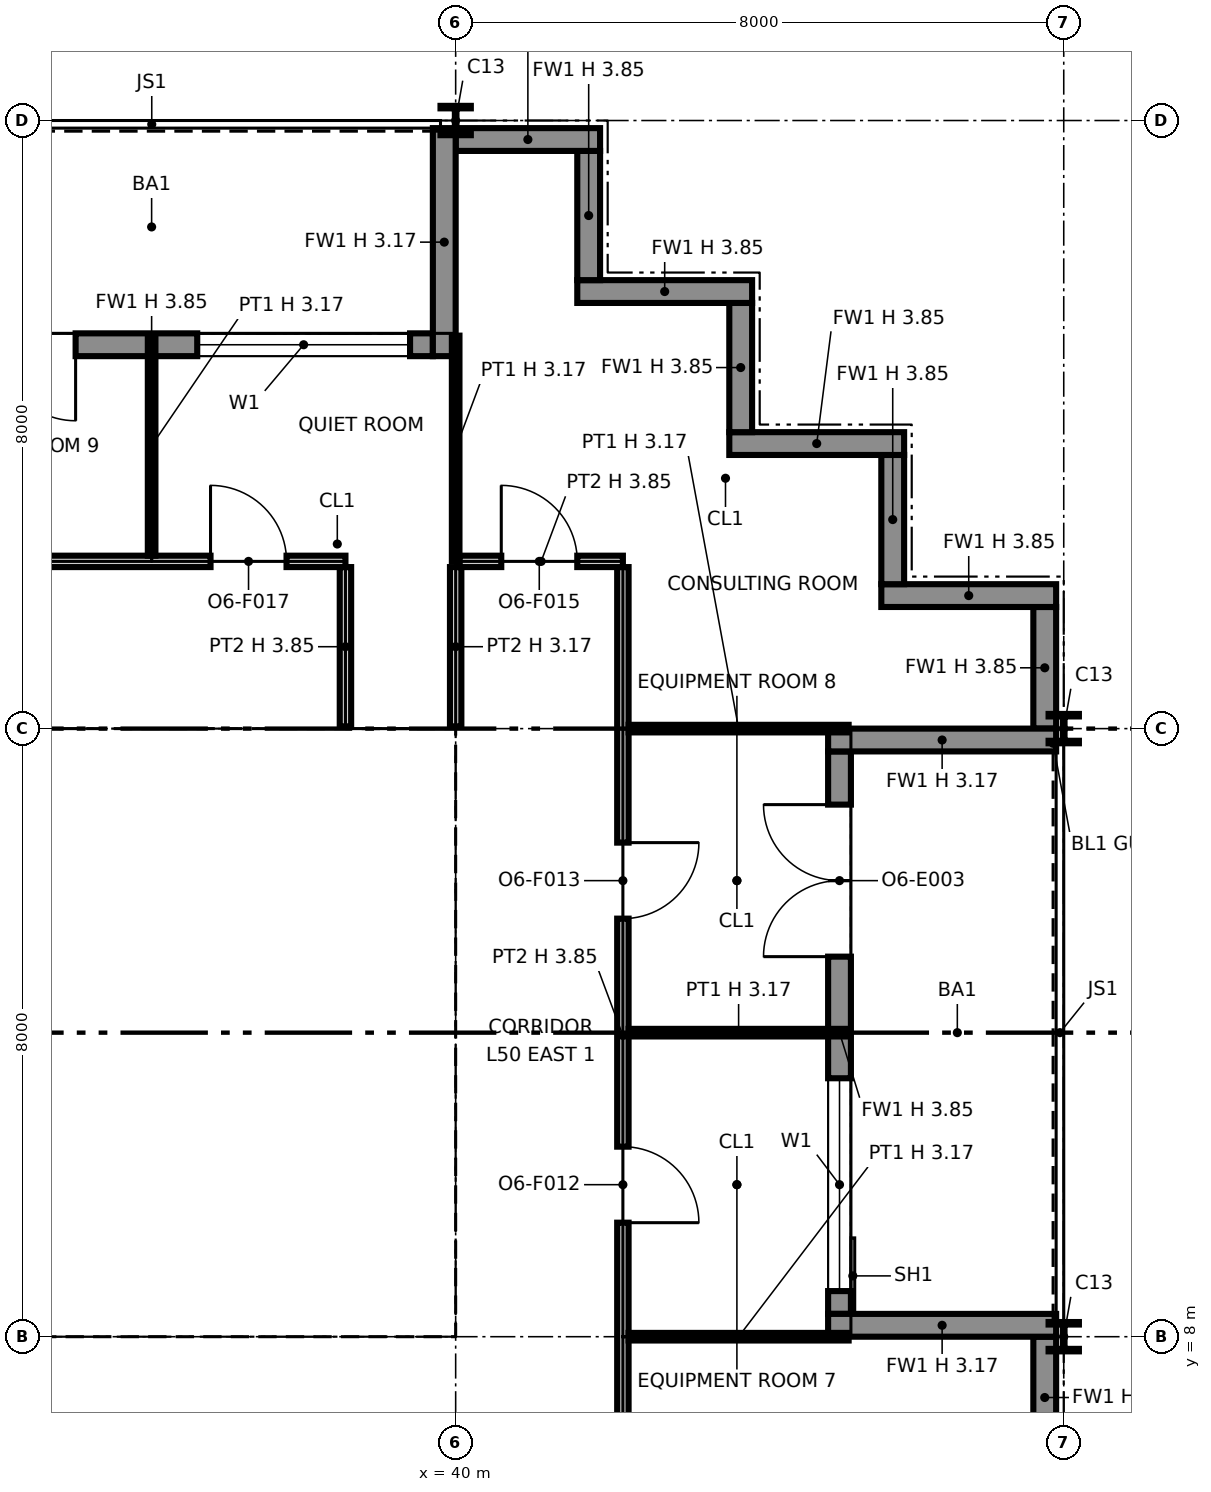
"""IFC4 building model, lengths in metres.
Left out: names, types, materials, properties, quantities, classifications, styles, units other than length and angle.
Written with IfcOpenShell. Run it as: python <this file> out.ifc"""

import sys

from ifc_helpers import new_model, si_unit, direction, frame, frame_2d, origin, origin_2d, place, context, subcontext, project, spatial, polyline, rectangle, i_section, outline, extrude, element, fill, save


model = new_model("IFC4")
c1 = context("Model", 3, precision=1e-05, world=origin(), true_north=direction((0.0, 1.0)))
c2 = subcontext(c1, "Body", "Model", "MODEL_VIEW")
j1 = project(units=[si_unit("LENGTHUNIT", "METRE"), si_unit("PLANEANGLEUNIT", "RADIAN")], contexts=[c1])
p1 = place(None, origin())
s1 = spatial("IfcSite", under=j1, at=p1, CompositionType="ELEMENT")
p2 = place(p1, origin())
s2 = spatial("IfcBuilding", under=s1, at=p2, CompositionType="ELEMENT")
p3 = place(p2, frame((0.0, 0.0, 233.0)))
s3 = spatial("IfcBuildingStorey", under=s2, at=p3, CompositionType="ELEMENT", Elevation=233.0)
for number, where, z_axis, x_axis in (
    (1, (40.0, 8.0, 0.0), (0.0, 0.0, 1.0), (1.0, 0.0, 0.0)),
    (2, (40.0, 16.0, 0.0), (0.0, 0.0, 1.0), (1.0, 0.0, 0.0)),
):
    element("IfcColumn", number, at=place(p3, frame(where, z_axis=z_axis, x_axis=x_axis)), inside=s3, PredefinedType="COLUMN", context=c2, shape_type="SweptSolid", body=[
        extrude(i_section(OverallWidth=0.373, OverallDepth=0.368, WebThickness=0.015, FlangeThickness=0.024, at=origin_2d()), origin(), (0.0, 0.0, 1.0), 3.85),
    ])
for number, where, z_axis, x_axis in (
    (3, (40.0, 24.0, 0.0), (0.0, 0.0, 1.0), (1.0, 0.0, 0.0)),
    (4, (48.0, 8.0, 0.0), (0.0, 0.0, 1.0), (1.0, 0.0, 0.0)),
    (5, (48.0, 16.0, 0.0), (0.0, 0.0, 1.0), (1.0, 0.0, 0.0)),
):
    element("IfcColumn", number, at=place(p3, frame(where, z_axis=z_axis, x_axis=x_axis)), inside=s3, PredefinedType="COLUMN", context=c2, shape_type="SweptSolid", body=[
        extrude(i_section(OverallWidth=0.399, OverallDepth=0.386, WebThickness=0.021, FlangeThickness=0.033, at=origin_2d()), origin(), (0.0, 0.0, 1.0), 3.85),
    ])
p4 = place(p3, frame((47.75, 6.4, 0.0), z_axis=(0.0, 0.0, 1.0), x_axis=(0.0, 1.0, 0.0)))
e6 = element("IfcWall", 6, at=p4, inside=s3, PredefinedType="SOLIDWALL", context=c2, shape_type="SweptSolid", body=[
    extrude(rectangle(XDim=1.6, YDim=0.3, at=frame_2d((0.8, 0.0))), origin(), (0.0, 0.0, 1.0), 3.85),
])
p5 = place(p3, frame((45.05, 8.3, 0.0), z_axis=(0.0, 0.0, 1.0), x_axis=(0.0, 1.0, 0.0)))
e7 = element("IfcWall", 7, at=p5, inside=s3, PredefinedType="SOLIDWALL", context=c2, shape_type="SweptSolid", body=[
    extrude(rectangle(XDim=7.4, YDim=0.3, at=frame_2d((3.7, 0.0))), origin(), (0.0, 0.0, 1.0), 3.85),
])
p6 = place(p5, frame((0.3, 0.0, 0.9)))
e8 = element("IfcOpeningElement", 8, at=p6, cuts=e7, PredefinedType="OPENING", context=c2, shape_type="SweptSolid", body=[
    extrude(rectangle(XDim=2.8, YDim=2.2, at=frame_2d((1.4, 1.1))), frame((0.0, 0.16, 0.0), z_axis=(0.0, -1.0, 0.0), x_axis=(1.0, 0.0, 0.0)), (0.0, 0.0, 1.0), 0.32),
])
p7 = place(p5, frame((4.7, 0.0, 0.0)))
e9 = element("IfcOpeningElement", 9, at=p7, cuts=e7, PredefinedType="OPENING", context=c2, shape_type="SweptSolid", body=[
    extrude(rectangle(XDim=2.0, YDim=2.4, at=frame_2d((1.0, 1.2))), frame((0.0, 0.16, 0.0), z_axis=(0.0, -1.0, 0.0), x_axis=(1.0, 0.0, 0.0)), (0.0, 0.0, 1.0), 0.32),
])
for number, where, z_axis, x_axis in (
    (10, (47.9, 8.15, 0.0), (0.0, 0.0, 1.0), (-1.0, 0.0, 0.0)),
    (11, (47.9, 15.85, 0.0), (0.0, 0.0, 1.0), (-1.0, 0.0, 0.0)),
):
    element("IfcWall", number, at=place(p3, frame(where, z_axis=z_axis, x_axis=x_axis)), inside=s3, PredefinedType="SOLIDWALL", context=c2, shape_type="SweptSolid", body=[
        extrude(rectangle(XDim=3.0, YDim=0.3, at=frame_2d((1.5, 0.0))), origin(), (0.0, 0.0, 1.0), 3.171),
    ])
p8 = place(p3, frame((47.75, 16.0, 0.0), z_axis=(0.0, 0.0, 1.0), x_axis=(0.0, 1.0, 0.0)))
e12 = element("IfcWall", 12, at=p8, inside=s3, PredefinedType="SOLIDWALL", context=c2, shape_type="SweptSolid", body=[
    extrude(rectangle(XDim=1.6, YDim=0.3, at=frame_2d((0.8, 0.0))), origin(), (0.0, 0.0, 1.0), 3.85),
])
p9 = place(p3, frame((47.9, 17.75, 0.0), z_axis=(0.0, 0.0, 1.0), x_axis=(-1.0, 0.0, 0.0)))
e13 = element("IfcWall", 13, at=p9, inside=s3, PredefinedType="SOLIDWALL", context=c2, shape_type="SweptSolid", body=[
    extrude(rectangle(XDim=2.3, YDim=0.3, at=frame_2d((1.15, 0.0))), origin(), (0.0, 0.0, 1.0), 3.85),
])
p10 = place(p3, frame((45.75, 17.9, 0.0), z_axis=(0.0, 0.0, 1.0), x_axis=(0.0, 1.0, 0.0)))
e14 = element("IfcWall", 14, at=p10, inside=s3, PredefinedType="SOLIDWALL", context=c2, shape_type="SweptSolid", body=[
    extrude(rectangle(XDim=1.7, YDim=0.3, at=frame_2d((0.85, 0.0))), origin(), (0.0, 0.0, 1.0), 3.85),
])
p11 = place(p3, frame((45.9, 19.75, 0.0), z_axis=(0.0, 0.0, 1.0), x_axis=(-1.0, 0.0, 0.0)))
e15 = element("IfcWall", 15, at=p11, inside=s3, PredefinedType="SOLIDWALL", context=c2, shape_type="SweptSolid", body=[
    extrude(rectangle(XDim=2.3, YDim=0.3, at=frame_2d((1.15, 0.0))), origin(), (0.0, 0.0, 1.0), 3.85),
])
p12 = place(p3, frame((43.75, 19.9, 0.0), z_axis=(0.0, 0.0, 1.0), x_axis=(0.0, 1.0, 0.0)))
e16 = element("IfcWall", 16, at=p12, inside=s3, PredefinedType="SOLIDWALL", context=c2, shape_type="SweptSolid", body=[
    extrude(rectangle(XDim=1.7, YDim=0.3, at=frame_2d((0.85, 0.0))), origin(), (0.0, 0.0, 1.0), 3.85),
])
p13 = place(p3, frame((43.9, 21.75, 0.0), z_axis=(0.0, 0.0, 1.0), x_axis=(-1.0, 0.0, 0.0)))
e17 = element("IfcWall", 17, at=p13, inside=s3, PredefinedType="SOLIDWALL", context=c2, shape_type="SweptSolid", body=[
    extrude(rectangle(XDim=2.3, YDim=0.3, at=frame_2d((1.15, 0.0))), origin(), (0.0, 0.0, 1.0), 3.85),
])
p14 = place(p3, frame((41.75, 21.9, 0.0), z_axis=(0.0, 0.0, 1.0), x_axis=(0.0, 1.0, 0.0)))
e18 = element("IfcWall", 18, at=p14, inside=s3, PredefinedType="SOLIDWALL", context=c2, shape_type="SweptSolid", body=[
    extrude(rectangle(XDim=1.7, YDim=0.3, at=frame_2d((0.85, 0.0))), origin(), (0.0, 0.0, 1.0), 3.85),
])
p15 = place(p3, frame((41.9, 23.75, 0.0), z_axis=(0.0, 0.0, 1.0), x_axis=(-1.0, 0.0, 0.0)))
e19 = element("IfcWall", 19, at=p15, inside=s3, PredefinedType="SOLIDWALL", context=c2, shape_type="SweptSolid", body=[
    extrude(rectangle(XDim=1.9, YDim=0.3, at=frame_2d((0.95, 0.0))), origin(), (0.0, 0.0, 1.0), 3.85),
])
p16 = place(p3, frame((39.7, 21.05, 0.0), z_axis=(0.0, 0.0, 1.0), x_axis=(-1.0, 0.0, 0.0)))
e20 = element("IfcWall", 20, at=p16, inside=s3, PredefinedType="SOLIDWALL", context=c2, shape_type="SweptSolid", body=[
    extrude(rectangle(XDim=7.4, YDim=0.3, at=frame_2d((3.7, 0.0))), origin(), (0.0, 0.0, 1.0), 3.85),
])
p17 = place(p16, frame((0.3, 0.0, 0.9)))
e21 = element("IfcOpeningElement", 21, at=p17, cuts=e20, PredefinedType="OPENING", context=c2, shape_type="SweptSolid", body=[
    extrude(rectangle(XDim=2.8, YDim=2.2, at=frame_2d((1.4, 1.1))), frame((0.0, 0.16, 0.0), z_axis=(0.0, -1.0, 0.0), x_axis=(1.0, 0.0, 0.0)), (0.0, 0.0, 1.0), 0.32),
])
p18 = place(p16, frame((4.7, 0.0, 0.0)))
e22 = element("IfcOpeningElement", 22, at=p18, cuts=e20, PredefinedType="OPENING", context=c2, shape_type="SweptSolid", body=[
    extrude(rectangle(XDim=2.0, YDim=2.4, at=frame_2d((1.0, 1.2))), frame((0.0, 0.16, 0.0), z_axis=(0.0, -1.0, 0.0), x_axis=(1.0, 0.0, 0.0)), (0.0, 0.0, 1.0), 0.32),
])
p19 = place(p3, frame((39.85, 23.9, 0.0), z_axis=(0.0, 0.0, 1.0), x_axis=(0.0, -1.0, 0.0)))
e23 = element("IfcWall", 23, at=p19, inside=s3, PredefinedType="SOLIDWALL", context=c2, shape_type="SweptSolid", body=[
    extrude(rectangle(XDim=3.0, YDim=0.3, at=frame_2d((1.5, 0.0))), origin(), (0.0, 0.0, 1.0), 3.171),
])
p20 = place(p3, frame((24.65, 8.75, 0.0), z_axis=(0.0, 0.0, 1.0), x_axis=(1.0, 0.0, 0.0)))
e24 = element("IfcWall", 24, at=p20, inside=s3, PredefinedType="PARTITIONING", context=c2, shape_type="SweptSolid", body=[
    extrude(outline(polyline([(0.0, 0.0), (14.7, 0.0), (14.7, 3.85), (7.438, 3.85), (7.438, 3.308), (7.262, 3.308), (7.261, 3.85), (0.0, 3.85), (0.0, 0.0)])), frame((0.0, 0.1, 0.0), z_axis=(0.0, -1.0, 0.0), x_axis=(1.0, 0.0, 0.0)), (0.0, 0.0, 1.0), 0.2),
])
p21 = place(p3, frame((24.65, 15.25, 0.0), z_axis=(0.0, 0.0, 1.0), x_axis=(1.0, 0.0, 0.0)))
e25 = element("IfcWall", 25, at=p21, inside=s3, PredefinedType="PARTITIONING", context=c2, shape_type="SweptSolid", body=[
    extrude(outline(polyline([(0.0, 0.0), (14.7, 0.0), (14.7, 3.85), (7.438, 3.85), (7.438, 3.308), (7.262, 3.308), (7.261, 3.85), (0.0, 3.85), (0.0, 0.0)])), frame((0.0, 0.1, 0.0), z_axis=(0.0, -1.0, 0.0), x_axis=(1.0, 0.0, 0.0)), (0.0, 0.0, 1.0), 0.2),
])
p22 = place(p21, frame((2.85, 0.0, 0.0)))
e26 = element("IfcOpeningElement", 26, at=p22, cuts=e25, PredefinedType="OPENING", context=c2, shape_type="SweptSolid", body=[
    extrude(rectangle(XDim=1.8, YDim=2.1, at=frame_2d((0.9, 1.05))), frame((0.0, 0.11, 0.0), z_axis=(0.0, -1.0, 0.0), x_axis=(1.0, 0.0, 0.0)), (0.0, 0.0, 1.0), 0.22),
])
p23 = place(p21, frame((9.95, 0.0, 0.0), z_axis=(0.0, 0.0, 1.0), x_axis=(-1.0, 0.0, 0.0)))
e27 = element("IfcOpeningElement", 27, at=p23, cuts=e25, PredefinedType="OPENING", context=c2, shape_type="SweptSolid", body=[
    extrude(rectangle(XDim=1.4, YDim=2.1, at=frame_2d((0.7, 1.05))), frame((0.0, 0.11, 0.0), z_axis=(0.0, -1.0, 0.0), x_axis=(1.0, 0.0, 0.0)), (0.0, 0.0, 1.0), 0.22),
])
p24 = place(p21, frame((13.4, 0.0, 0.0), z_axis=(0.0, 0.0, 1.0), x_axis=(-1.0, 0.0, 0.0)))
e28 = element("IfcOpeningElement", 28, at=p24, cuts=e25, PredefinedType="OPENING", context=c2, shape_type="SweptSolid", body=[
    extrude(rectangle(XDim=1.4, YDim=2.1, at=frame_2d((0.7, 1.05))), frame((0.0, 0.11, 0.0), z_axis=(0.0, -1.0, 0.0), x_axis=(1.0, 0.0, 0.0)), (0.0, 0.0, 1.0), 0.22),
])
for number, where, z_axis, x_axis in (
    (29, (35.6, 8.85, 0.0), (0.0, 0.0, 1.0), (0.0, 1.0, 0.0)),
    (30, (39.25, 8.85, 0.0), (0.0, 0.0, 1.0), (0.0, 1.0, 0.0)),
):
    element("IfcWall", number, at=place(p3, frame(where, z_axis=z_axis, x_axis=x_axis)), inside=s3, PredefinedType="PARTITIONING", context=c2, shape_type="SweptSolid", body=[
        extrude(rectangle(XDim=6.3, YDim=0.2, at=frame_2d((3.15, 0.0))), origin(), (0.0, 0.0, 1.0), 3.85),
    ])
p25 = place(p3, frame((42.2, 5.8, 0.0), z_axis=(0.0, 0.0, 1.0), x_axis=(0.0, 1.0, 0.0)))
e31 = element("IfcWall", 31, at=p25, inside=s3, PredefinedType="PARTITIONING", context=c2, shape_type="SweptSolid", body=[
    extrude(outline(polyline([(0.0, 0.0), (12.325, 0.0), (12.325, 3.85), (10.5, 3.85), (10.498, 3.172), (9.902, 3.172), (9.9, 3.85), (6.5, 3.85), (6.498, 3.172), (5.902, 3.172), (5.9, 3.85), (2.5, 3.85), (2.498, 3.172), (1.902, 3.172), (1.9, 3.85), (0.0, 3.85), (0.0, 0.0)])), frame((0.0, 0.075, 0.0), z_axis=(0.0, -1.0, 0.0), x_axis=(1.0, 0.0, 0.0)), (0.0, 0.0, 1.0), 0.15),
])
p26 = place(p25, frame((4.7, 0.0, 0.0), z_axis=(0.0, 0.0, 1.0), x_axis=(-1.0, 0.0, 0.0)))
e32 = element("IfcOpeningElement", 32, at=p26, cuts=e31, PredefinedType="OPENING", context=c2, shape_type="SweptSolid", body=[
    extrude(rectangle(XDim=1.0, YDim=2.1, at=frame_2d((0.5, 1.05))), frame((0.0, 0.085, 0.0), z_axis=(0.0, -1.0, 0.0), x_axis=(1.0, 0.0, 0.0)), (0.0, 0.0, 1.0), 0.17),
])
p27 = place(p25, frame((8.7, 0.0, 0.0), z_axis=(0.0, 0.0, 1.0), x_axis=(-1.0, 0.0, 0.0)))
e33 = element("IfcOpeningElement", 33, at=p27, cuts=e31, PredefinedType="OPENING", context=c2, shape_type="SweptSolid", body=[
    extrude(rectangle(XDim=1.0, YDim=2.1, at=frame_2d((0.5, 1.05))), frame((0.0, 0.085, 0.0), z_axis=(0.0, -1.0, 0.0), x_axis=(1.0, 0.0, 0.0)), (0.0, 0.0, 1.0), 0.17),
])
for number, where, z_axis, x_axis in (
    (34, (42.275, 8.0, 0.0), (0.0, 0.0, 1.0), (1.0, 0.0, 0.0)),
    (35, (42.275, 12.0, 0.0), (0.0, 0.0, 1.0), (1.0, 0.0, 0.0)),
    (36, (42.275, 16.0, 0.0), (0.0, 0.0, 1.0), (1.0, 0.0, 0.0)),
):
    element("IfcWall", number, at=place(p3, frame(where, z_axis=z_axis, x_axis=x_axis)), inside=s3, PredefinedType="PARTITIONING", context=c2, shape_type="SweptSolid", body=[
        extrude(rectangle(XDim=2.895, YDim=0.1, at=frame_2d((1.448, 0.0))), origin(), (0.0, 0.0, 1.0), 3.172),
    ])
p28 = place(p3, frame((38.55, 16.03, 0.0), z_axis=(0.0, 0.0, 1.0), x_axis=(0.0, 1.0, 0.0)))
e37 = element("IfcWall", 37, at=p28, inside=s3, PredefinedType="PARTITIONING", context=c2, shape_type="SweptSolid", body=[
    extrude(rectangle(XDim=2.095, YDim=0.15, at=frame_2d((1.047, 0.0))), origin(), (0.0, 0.0, 1.0), 3.85),
])
p29 = place(p3, frame((40.0, 16.03, 0.0), z_axis=(0.0, 0.0, 1.0), x_axis=(0.0, 1.0, 0.0)))
e38 = element("IfcWall", 38, at=p29, inside=s3, PredefinedType="PARTITIONING", context=c2, shape_type="SweptSolid", body=[
    extrude(rectangle(XDim=2.095, YDim=0.15, at=frame_2d((1.047, 0.0))), origin(), (0.0, 0.0, 1.0), 3.172),
])
p30 = place(p3, frame((26.275, 18.2, 0.0), z_axis=(0.0, 0.0, 1.0), x_axis=(1.0, 0.0, 0.0)))
e39 = element("IfcWall", 39, at=p30, inside=s3, PredefinedType="PARTITIONING", context=c2, shape_type="SweptSolid", body=[
    extrude(rectangle(XDim=12.275, YDim=0.15, at=frame_2d((6.138, 0.0))), origin(), (0.0, 0.0, 1.0), 3.85),
])
p31 = place(p30, frame((7.225, 0.0, 0.0)))
e40 = element("IfcOpeningElement", 40, at=p31, cuts=e39, PredefinedType="OPENING", context=c2, shape_type="SweptSolid", body=[
    extrude(rectangle(XDim=1.0, YDim=2.1, at=frame_2d((0.5, 1.05))), frame((0.0, 0.085, 0.0), z_axis=(0.0, -1.0, 0.0), x_axis=(1.0, 0.0, 0.0)), (0.0, 0.0, 1.0), 0.17),
])
p32 = place(p30, frame((10.5, 0.0, 0.0)))
e41 = element("IfcOpeningElement", 41, at=p32, cuts=e39, PredefinedType="OPENING", context=c2, shape_type="SweptSolid", body=[
    extrude(rectangle(XDim=1.0, YDim=2.1, at=frame_2d((0.5, 1.05))), frame((0.0, 0.085, 0.0), z_axis=(0.0, -1.0, 0.0), x_axis=(1.0, 0.0, 0.0)), (0.0, 0.0, 1.0), 0.17),
])
p33 = place(p30, frame((2.725, 0.0, 0.0)))
e42 = element("IfcOpeningElement", 42, at=p33, cuts=e39, PredefinedType="OPENING", context=c2, shape_type="SweptSolid", body=[
    extrude(rectangle(XDim=1.0, YDim=2.1, at=frame_2d((0.5, 1.05))), frame((0.0, 0.085, 0.0), z_axis=(0.0, -1.0, 0.0), x_axis=(1.0, 0.0, 0.0)), (0.0, 0.0, 1.0), 0.17),
])
p34 = place(p3, frame((36.0, 18.275, 0.0), z_axis=(0.0, 0.0, 1.0), x_axis=(0.0, 1.0, 0.0)))
e43 = element("IfcWall", 43, at=p34, inside=s3, PredefinedType="PARTITIONING", context=c2, shape_type="SweptSolid", body=[
    extrude(rectangle(XDim=2.895, YDim=0.1, at=frame_2d((1.448, 0.0))), origin(), (0.0, 0.0, 1.0), 3.172),
])
p35 = place(p3, frame((40.05, 18.2, 0.0), z_axis=(0.0, 0.0, 1.0), x_axis=(1.0, 0.0, 0.0)))
e44 = element("IfcWall", 44, at=p35, inside=s3, PredefinedType="PARTITIONING", context=c2, shape_type="SweptSolid", body=[
    extrude(rectangle(XDim=2.15, YDim=0.15, at=frame_2d((1.075, 0.0))), origin(), (0.0, 0.0, 1.0), 3.85),
])
p36 = place(p35, frame((0.55, 0.0, 0.0)))
e45 = element("IfcOpeningElement", 45, at=p36, cuts=e44, PredefinedType="OPENING", context=c2, shape_type="SweptSolid", body=[
    extrude(rectangle(XDim=1.0, YDim=2.1, at=frame_2d((0.5, 1.05))), frame((0.0, 0.085, 0.0), z_axis=(0.0, -1.0, 0.0), x_axis=(1.0, 0.0, 0.0)), (0.0, 0.0, 1.0), 0.17),
])
p37 = place(p3, frame((40.0, 18.2, 0.0), z_axis=(0.0, 0.0, 1.0), x_axis=(0.0, 1.0, 0.0)))
e46 = element("IfcWall", 46, at=p37, inside=s3, PredefinedType="PARTITIONING", context=c2, shape_type="SweptSolid", body=[
    extrude(rectangle(XDim=2.97, YDim=0.1, at=frame_2d((1.485, 0.0))), origin(), (0.0, 0.0, 1.0), 3.172),
])
p38 = place(p6, origin())
e47 = element("IfcWindow", 47, at=p38, inside=s3, PartitioningType="SINGLE_PANEL", PredefinedType="WINDOW", context=c2, shape_type="SweptSolid", body=[
    extrude(rectangle(XDim=2.8, YDim=2.2, at=frame_2d((1.4, 1.1))), frame((0.0, 0.03, 0.0), z_axis=(0.0, -1.0, 0.0), x_axis=(1.0, 0.0, 0.0)), (0.0, 0.0, 1.0), 0.06),
])
fill(e8, e47)
p39 = place(p7, origin())
e48 = element("IfcDoor", 48, at=p39, inside=s3, OperationType="DOUBLE_DOOR_SINGLE_SWING", PredefinedType="DOOR", context=c2, shape_type="SweptSolid", body=[
    extrude(rectangle(XDim=2.0, YDim=2.4, at=frame_2d((1.0, 1.2))), frame((0.0, 0.025, 0.0), z_axis=(0.0, -1.0, 0.0), x_axis=(1.0, 0.0, 0.0)), (0.0, 0.0, 1.0), 0.05),
])
fill(e9, e48)
p40 = place(p17, origin())
e49 = element("IfcWindow", 49, at=p40, inside=s3, PartitioningType="SINGLE_PANEL", PredefinedType="WINDOW", context=c2, shape_type="SweptSolid", body=[
    extrude(rectangle(XDim=2.8, YDim=2.2, at=frame_2d((1.4, 1.1))), frame((0.0, 0.03, 0.0), z_axis=(0.0, -1.0, 0.0), x_axis=(1.0, 0.0, 0.0)), (0.0, 0.0, 1.0), 0.06),
])
fill(e21, e49)
p41 = place(p18, origin())
e50 = element("IfcDoor", 50, at=p41, inside=s3, OperationType="DOUBLE_DOOR_SINGLE_SWING", PredefinedType="DOOR", context=c2, shape_type="SweptSolid", body=[
    extrude(rectangle(XDim=2.0, YDim=2.4, at=frame_2d((1.0, 1.2))), frame((0.0, 0.025, 0.0), z_axis=(0.0, -1.0, 0.0), x_axis=(1.0, 0.0, 0.0)), (0.0, 0.0, 1.0), 0.05),
])
fill(e22, e50)
p42 = place(p24, origin())
e51 = element("IfcDoor", 51, at=p42, inside=s3, OperationType="DOUBLE_DOOR_SINGLE_SWING", PredefinedType="NOTDEFINED", context=c2, shape_type="SweptSolid", body=[
    extrude(rectangle(XDim=1.4, YDim=2.1, at=frame_2d((0.7, 1.05))), frame((0.0, 0.025, 0.0), z_axis=(0.0, -1.0, 0.0), x_axis=(1.0, 0.0, 0.0)), (0.0, 0.0, 1.0), 0.05),
])
fill(e28, e51)
p43 = place(p26, origin())
e52 = element("IfcDoor", 52, at=p43, inside=s3, OperationType="SINGLE_SWING_RIGHT", PredefinedType="DOOR", context=c2, shape_type="SweptSolid", body=[
    extrude(rectangle(XDim=1.0, YDim=2.1, at=frame_2d((0.5, 1.05))), frame((0.0, 0.025, 0.0), z_axis=(0.0, -1.0, 0.0), x_axis=(1.0, 0.0, 0.0)), (0.0, 0.0, 1.0), 0.05),
])
fill(e32, e52)
p44 = place(p27, origin())
e53 = element("IfcDoor", 53, at=p44, inside=s3, OperationType="SINGLE_SWING_LEFT", PredefinedType="DOOR", context=c2, shape_type="SweptSolid", body=[
    extrude(rectangle(XDim=1.0, YDim=2.1, at=frame_2d((0.5, 1.05))), frame((0.0, 0.025, 0.0), z_axis=(0.0, -1.0, 0.0), x_axis=(1.0, 0.0, 0.0)), (0.0, 0.0, 1.0), 0.05),
])
fill(e33, e53)
p45 = place(p36, origin())
e54 = element("IfcDoor", 54, at=p45, inside=s3, OperationType="SINGLE_SWING_LEFT", PredefinedType="DOOR", context=c2, shape_type="SweptSolid", body=[
    extrude(rectangle(XDim=1.0, YDim=2.1, at=frame_2d((0.5, 1.05))), frame((0.0, 0.025, 0.0), z_axis=(0.0, -1.0, 0.0), x_axis=(1.0, 0.0, 0.0)), (0.0, 0.0, 1.0), 0.05),
])
fill(e45, e54)
p46 = place(p32, origin())
e55 = element("IfcDoor", 55, at=p46, inside=s3, OperationType="SINGLE_SWING_LEFT", PredefinedType="DOOR", context=c2, shape_type="SweptSolid", body=[
    extrude(rectangle(XDim=1.0, YDim=2.1, at=frame_2d((0.5, 1.05))), frame((0.0, 0.025, 0.0), z_axis=(0.0, -1.0, 0.0), x_axis=(1.0, 0.0, 0.0)), (0.0, 0.0, 1.0), 0.05),
])
fill(e41, e55)
save(model, sys.argv[1])
